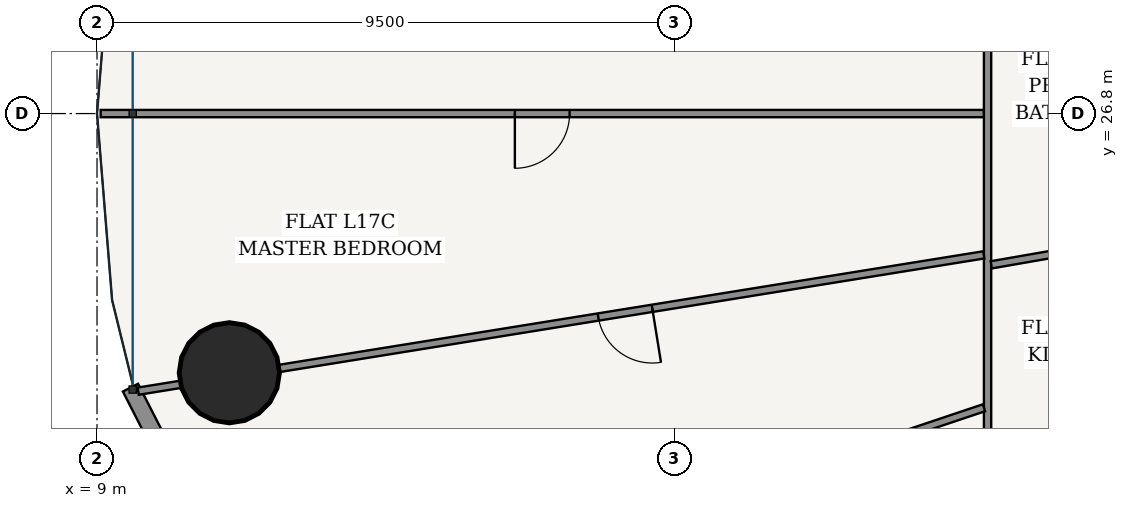
"""IFC4 building model, lengths in metres.
Left out: names, types, materials, properties, quantities, classifications, styles, units other than length and angle.
Written with IfcOpenShell. Run it as: python <this file> out.ifc"""

import sys

from ifc_helpers import new_model, si_unit, direction, frame, frame_2d, origin, origin_2d, place, context, subcontext, project, spatial, rectangle, hollow_circle, extrude, source, transform, mapped, element, fill, save


model = new_model("IFC4")
c1 = context("Model", 3, precision=1e-05, world=origin(), true_north=direction((-0.2419218956, 0.970295726276)))
c2 = subcontext(c1, "Body", "Model", "MODEL_VIEW")
j1 = project(units=[si_unit("LENGTHUNIT", "METRE"), si_unit("PLANEANGLEUNIT", "RADIAN")], contexts=[c1])
p1 = place(None, origin())
s1 = spatial("IfcSite", under=j1, at=p1, CompositionType="ELEMENT")
p2 = place(p1, origin())
s2 = spatial("IfcBuilding", under=s1, at=p2, CompositionType="ELEMENT")
p3 = place(p2, frame((0.0, 0.0, 67.2)))
s3 = spatial("IfcBuildingStorey", under=s2, at=p3, CompositionType="ELEMENT", Elevation=67.2)
p4 = place(p3, frame((11.176, 22.537, 0.0), z_axis=(0.0, 0.0, 1.0), x_axis=(1.0, 0.0, 0.0)))
e1 = element("IfcColumn", 1, at=p4, inside=s3, PredefinedType="COLUMN", context=c2, shape_type="SweptSolid", body=[
    extrude(hollow_circle(Radius=0.825, WallThickness=0.05, at=origin_2d()), origin(), (0.0, 0.0, 1.0), 3.6),
])
p5 = place(p3, frame((9.55, 22.292, 0.0), z_axis=(0.0, 0.0, 1.0), x_axis=(0.455220575541, -0.890378698984, 0.0)))
e2 = element("IfcWall", 2, at=p5, inside=s3, PredefinedType="SOLIDWALL", context=c2, shape_type="SweptSolid", body=[
    extrude(rectangle(XDim=9.662, YDim=0.28, at=frame_2d((4.831, 0.0))), origin(), (0.0, 0.0, 1.0), 3.32),
])
p6 = place(p5, frame((1.559, 0.0, 0.85)))
e3 = element("IfcOpeningElement", 3, at=p6, cuts=e2, PredefinedType="OPENING", context=c2, shape_type="SweptSolid", body=[
    extrude(rectangle(XDim=2.1, YDim=1.95, at=frame_2d((1.05, 0.975))), frame((0.0, 0.15, 0.0), z_axis=(0.0, -1.0, 0.0), x_axis=(1.0, 0.0, 0.0)), (0.0, 0.0, 1.0), 0.3),
])
p7 = place(p5, frame((6.003, 0.0, 0.85)))
e4 = element("IfcOpeningElement", 4, at=p7, cuts=e2, PredefinedType="OPENING", context=c2, shape_type="SweptSolid", body=[
    extrude(rectangle(XDim=2.1, YDim=1.95, at=frame_2d((1.05, 0.975))), frame((0.0, 0.15, 0.0), z_axis=(0.0, -1.0, 0.0), x_axis=(1.0, 0.0, 0.0)), (0.0, 0.0, 1.0), 0.3),
])
p8 = place(p3, frame((23.645, 19.129, 0.0), z_axis=(0.0, 0.0, 1.0), x_axis=(0.0, 1.0, 0.0)))
e5 = element("IfcWall", 5, at=p8, inside=s3, PredefinedType="PARTITIONING", context=c2, shape_type="SweptSolid", body=[
    extrude(rectangle(XDim=19.201, YDim=0.12, at=frame_2d((9.601, 0.0))), origin(), (0.0, 0.0, 1.0), 2.688),
])
p9 = place(p8, frame((15.038, 0.0, 0.0)))
e6 = element("IfcOpeningElement", 6, at=p9, cuts=e5, PredefinedType="OPENING", context=c2, shape_type="SweptSolid", body=[
    extrude(rectangle(XDim=0.9, YDim=2.15, at=frame_2d((0.45, 1.075))), frame((0.0, 0.07, 0.0), z_axis=(0.0, -1.0, 0.0), x_axis=(1.0, 0.0, 0.0)), (0.0, 0.0, 1.0), 0.14),
])
p10 = place(p8, frame((1.136, 0.0, 0.0)))
e7 = element("IfcOpeningElement", 7, at=p10, cuts=e5, PredefinedType="OPENING", context=c2, shape_type="SweptSolid", body=[
    extrude(rectangle(XDim=0.9, YDim=2.15, at=frame_2d((0.45, 1.075))), frame((0.0, 0.07, 0.0), z_axis=(0.0, -1.0, 0.0), x_axis=(1.0, 0.0, 0.0)), (0.0, 0.0, 1.0), 0.14),
])
p11 = place(p3, frame((23.583, 26.8, 0.0), z_axis=(0.0, 0.0, 1.0), x_axis=(-1.0, 0.0, 0.0)))
e8 = element("IfcWall", 8, at=p11, inside=s3, PredefinedType="PARTITIONING", context=c2, shape_type="SweptSolid", body=[
    extrude(rectangle(XDim=14.523, YDim=0.12, at=frame_2d((7.261, 0.0))), origin(), (0.0, 0.0, 1.0), 2.762),
])
p12 = place(p11, frame((6.812, 0.0, 0.0)))
e9 = element("IfcOpeningElement", 9, at=p12, cuts=e8, PredefinedType="OPENING", context=c2, shape_type="SweptSolid", body=[
    extrude(rectangle(XDim=0.9, YDim=2.15, at=frame_2d((0.45, 1.075))), frame((0.0, 0.07, 0.0), z_axis=(0.0, -1.0, 0.0), x_axis=(1.0, 0.0, 0.0)), (0.0, 0.0, 1.0), 0.14),
])
p13 = place(p3, frame((23.584, 24.476, 0.0), z_axis=(0.0, 0.0, 1.0), x_axis=(-0.987257727093, -0.159129445092, 0.0)))
e10 = element("IfcWall", 10, at=p13, inside=s3, PredefinedType="PARTITIONING", context=c2, shape_type="SweptSolid", body=[
    extrude(rectangle(XDim=14.086, YDim=0.12, at=frame_2d((7.043, 0.0))), origin(), (0.0, 0.0, 1.0), 2.688),
])
p14 = place(p13, frame((5.523, 0.0, 0.0)))
e11 = element("IfcOpeningElement", 11, at=p14, cuts=e10, PredefinedType="OPENING", context=c2, shape_type="SweptSolid", body=[
    extrude(rectangle(XDim=0.9, YDim=2.15, at=frame_2d((0.45, 1.075))), frame((0.0, 0.07, 0.0), z_axis=(0.0, -1.0, 0.0), x_axis=(1.0, 0.0, 0.0)), (0.0, 0.0, 1.0), 0.14),
])
p15 = place(p3, frame((23.586, 21.962, 0.0), z_axis=(0.0, 0.0, 1.0), x_axis=(-0.948021751459, -0.318205529118, 0.0)))
e12 = element("IfcWall", 12, at=p15, inside=s3, PredefinedType="PARTITIONING", context=c2, shape_type="SweptSolid", body=[
    extrude(rectangle(XDim=12.994, YDim=0.12, at=frame_2d((6.497, 0.0))), origin(), (0.0, 0.0, 1.0), 2.762),
])
p16 = place(p15, frame((6.047, 0.0, 0.0)))
e13 = element("IfcOpeningElement", 13, at=p16, cuts=e12, PredefinedType="OPENING", context=c2, shape_type="SweptSolid", body=[
    extrude(rectangle(XDim=0.9, YDim=2.15, at=frame_2d((0.45, 1.075))), frame((0.0, 0.07, 0.0), z_axis=(0.0, -1.0, 0.0), x_axis=(1.0, 0.0, 0.0)), (0.0, 0.0, 1.0), 0.14),
])
p17 = place(p3, frame((26.565, 24.81, 0.0), z_axis=(0.0, 0.0, 1.0), x_axis=(-0.985190752909, -0.171461891924, 0.0)))
e14 = element("IfcWall", 14, at=p17, inside=s3, PredefinedType="PARTITIONING", context=c2, shape_type="SweptSolid", body=[
    extrude(rectangle(XDim=2.902, YDim=0.12, at=frame_2d((1.451, 0.0))), origin(), (0.0, 0.0, 1.0), 2.688),
])
m1 = source(origin(), c2, "Body", "SweptSolid", [
    extrude(rectangle(XDim=0.9, YDim=2.15, at=frame_2d((0.45, 1.075))), frame((0.0, 0.025, 0.0), z_axis=(0.0, -1.0, 0.0), x_axis=(1.0, 0.0, 0.0)), (0.0, 0.0, 1.0), 0.05),
])
p18 = place(p12, origin())
e15 = element("IfcDoor", 15, at=p18, inside=s3, OperationType="SINGLE_SWING_RIGHT", PredefinedType="DOOR", context=c2, shape_type="MappedRepresentation", body=[
    mapped(m1, transform((0.0, 0.0, 0.0), scale=1.0)),
])
fill(e9, e15)
p19 = place(p14, origin())
e16 = element("IfcDoor", 16, at=p19, inside=s3, OperationType="SINGLE_SWING_LEFT", PredefinedType="DOOR", context=c2, shape_type="MappedRepresentation", body=[
    mapped(m1, transform((0.0, 0.0, 0.0), scale=1.0)),
])
fill(e11, e16)
save(model, sys.argv[1])
